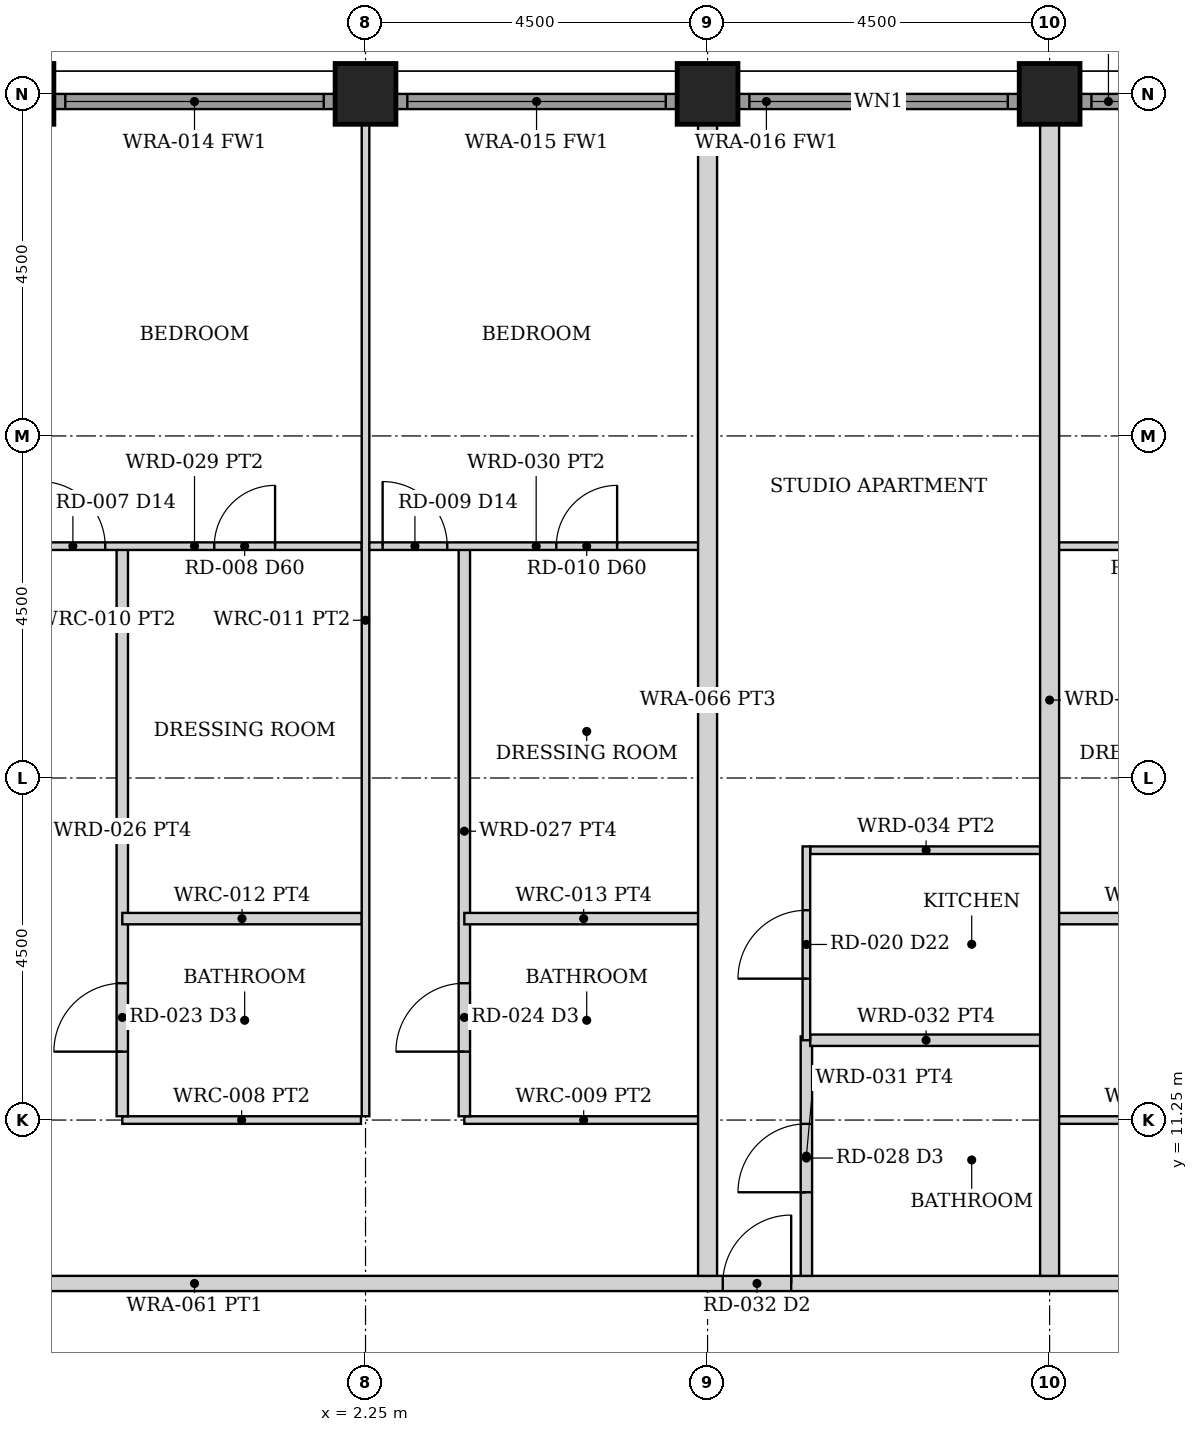
"""IFC4 building model, lengths in metres.
Left out: names, types, materials, properties, quantities, classifications, styles, units other than length and angle.
Written with IfcOpenShell. Run it as: python <this file> out.ifc"""

import sys

from ifc_helpers import new_model, si_unit, direction, frame, frame_2d, origin, origin_2d, place, context, subcontext, project, spatial, rectangle, hollow_rectangle, extrude, element, fill, save


model = new_model("IFC4")
c1 = context("Model", 3, precision=1e-05, world=origin(), true_north=direction((0.0, 1.0)))
c2 = subcontext(c1, "Body", "Model", "MODEL_VIEW")
j1 = project(units=[si_unit("LENGTHUNIT", "METRE"), si_unit("PLANEANGLEUNIT", "RADIAN")], contexts=[c1])
p1 = place(None, origin())
s1 = spatial("IfcSite", under=j1, at=p1, CompositionType="ELEMENT")
p2 = place(p1, origin())
s2 = spatial("IfcBuilding", under=s1, at=p2, CompositionType="ELEMENT")
p3 = place(p2, frame((0.0, 0.0, 58.0)))
s3 = spatial("IfcBuildingStorey", under=s2, at=p3, CompositionType="ELEMENT", Elevation=58.0)
for number, where, z_axis, x_axis in (
    (1, (-2.25, 24.75, 0.0), (0.0, 0.0, 1.0), (0.0, 1.0, 0.0)),
    (2, (2.25, 24.75, 0.0), (0.0, 0.0, 1.0), (0.0, 1.0, 0.0)),
    (3, (6.75, 24.75, 0.0), (0.0, 0.0, 1.0), (0.0, 1.0, 0.0)),
    (4, (11.25, 24.75, 0.0), (0.0, 0.0, 1.0), (0.0, 1.0, 0.0)),
):
    element("IfcColumn", number, at=place(p3, frame(where, z_axis=z_axis, x_axis=x_axis)), inside=s3, PredefinedType="COLUMN", context=c2, shape_type="SweptSolid", body=[
        extrude(hollow_rectangle(XDim=0.8, YDim=0.8, WallThickness=0.06, at=origin_2d()), origin(), (0.0, 0.0, 1.0), 3.5),
    ])
p4 = place(p3, frame((-1.845, 24.65, 0.0), z_axis=(0.0, 0.0, 1.0), x_axis=(1.0, 0.0, 0.0)))
e5 = element("IfcWall", 5, at=p4, inside=s3, PredefinedType="SOLIDWALL", context=c2, shape_type="SweptSolid", body=[
    extrude(rectangle(XDim=3.69, YDim=0.2, at=frame_2d((1.845, 0.0))), origin(), (0.0, 0.0, 1.0), 2.379),
])
p5 = place(p4, frame((0.145, 0.0, 0.3)))
e6 = element("IfcOpeningElement", 6, at=p5, cuts=e5, PredefinedType="OPENING", context=c2, shape_type="SweptSolid", body=[
    extrude(rectangle(XDim=3.4, YDim=1.929, at=frame_2d((1.7, 0.964))), frame((0.0, 0.11, 0.0), z_axis=(0.0, -1.0, 0.0), x_axis=(1.0, 0.0, 0.0)), (0.0, 0.0, 1.0), 0.22),
])
p6 = place(p3, frame((2.655, 24.65, 0.0), z_axis=(0.0, 0.0, 1.0), x_axis=(1.0, 0.0, 0.0)))
e7 = element("IfcWall", 7, at=p6, inside=s3, PredefinedType="SOLIDWALL", context=c2, shape_type="SweptSolid", body=[
    extrude(rectangle(XDim=3.69, YDim=0.2, at=frame_2d((1.845, 0.0))), origin(), (0.0, 0.0, 1.0), 2.379),
])
p7 = place(p6, frame((0.145, 0.0, 0.3)))
e8 = element("IfcOpeningElement", 8, at=p7, cuts=e7, PredefinedType="OPENING", context=c2, shape_type="SweptSolid", body=[
    extrude(rectangle(XDim=3.4, YDim=1.929, at=frame_2d((1.7, 0.964))), frame((0.0, 0.11, 0.0), z_axis=(0.0, -1.0, 0.0), x_axis=(1.0, 0.0, 0.0)), (0.0, 0.0, 1.0), 0.22),
])
p8 = place(p3, frame((7.155, 24.65, 0.0), z_axis=(0.0, 0.0, 1.0), x_axis=(1.0, 0.0, 0.0)))
e9 = element("IfcWall", 9, at=p8, inside=s3, PredefinedType="SOLIDWALL", context=c2, shape_type="SweptSolid", body=[
    extrude(rectangle(XDim=3.69, YDim=0.2, at=frame_2d((1.845, 0.0))), origin(), (0.0, 0.0, 1.0), 2.379),
])
p9 = place(p8, frame((0.145, 0.0, 0.3)))
e10 = element("IfcOpeningElement", 10, at=p9, cuts=e9, PredefinedType="OPENING", context=c2, shape_type="SweptSolid", body=[
    extrude(rectangle(XDim=3.4, YDim=1.929, at=frame_2d((1.7, 0.964))), frame((0.0, 0.11, 0.0), z_axis=(0.0, -1.0, 0.0), x_axis=(1.0, 0.0, 0.0)), (0.0, 0.0, 1.0), 0.22),
])
p10 = place(p3, frame((11.655, 24.65, 0.0), z_axis=(0.0, 0.0, 1.0), x_axis=(1.0, 0.0, 0.0)))
e11 = element("IfcWall", 11, at=p10, inside=s3, PredefinedType="SOLIDWALL", context=c2, shape_type="SweptSolid", body=[
    extrude(rectangle(XDim=3.69, YDim=0.2, at=frame_2d((1.845, 0.0))), origin(), (0.0, 0.0, 1.0), 2.379),
])
p11 = place(p10, frame((0.145, 0.0, 0.3)))
e12 = element("IfcOpeningElement", 12, at=p11, cuts=e11, PredefinedType="OPENING", context=c2, shape_type="SweptSolid", body=[
    extrude(rectangle(XDim=3.4, YDim=1.929, at=frame_2d((1.7, 0.964))), frame((0.0, 0.11, 0.0), z_axis=(0.0, -1.0, 0.0), x_axis=(1.0, 0.0, 0.0)), (0.0, 0.0, 1.0), 0.22),
])
p12 = place(p3, frame((-24.55, 9.1, 0.0), z_axis=(0.0, 0.0, 1.0), x_axis=(1.0, 0.0, 0.0)))
e13 = element("IfcWall", 13, at=p12, inside=s3, PredefinedType="PARTITIONING", context=c2, shape_type="SweptSolid", body=[
    extrude(rectangle(XDim=49.1, YDim=0.2, at=frame_2d((24.55, 0.0))), origin(), (0.0, 0.0, 1.0), 2.373),
])
p13 = place(p12, frame((5.1, 0.0, 0.0)))
e14 = element("IfcOpeningElement", 14, at=p13, cuts=e13, PredefinedType="OPENING", context=c2, shape_type="SweptSolid", body=[
    extrude(rectangle(XDim=0.9, YDim=2.1, at=frame_2d((0.45, 1.05))), frame((0.0, 0.11, 0.0), z_axis=(0.0, -1.0, 0.0), x_axis=(1.0, 0.0, 0.0)), (0.0, 0.0, 1.0), 0.22),
])
p14 = place(p12, frame((13.5, 0.0, 0.0)))
e15 = element("IfcOpeningElement", 15, at=p14, cuts=e13, PredefinedType="OPENING", context=c2, shape_type="SweptSolid", body=[
    extrude(rectangle(XDim=0.9, YDim=2.1, at=frame_2d((0.45, 1.05))), frame((0.0, 0.11, 0.0), z_axis=(0.0, -1.0, 0.0), x_axis=(1.0, 0.0, 0.0)), (0.0, 0.0, 1.0), 0.22),
])
p15 = place(p12, frame((18.1, 0.0, 0.0)))
e16 = element("IfcOpeningElement", 16, at=p15, cuts=e13, PredefinedType="OPENING", context=c2, shape_type="SweptSolid", body=[
    extrude(rectangle(XDim=0.9, YDim=2.1, at=frame_2d((0.45, 1.05))), frame((0.0, 0.11, 0.0), z_axis=(0.0, -1.0, 0.0), x_axis=(1.0, 0.0, 0.0)), (0.0, 0.0, 1.0), 0.22),
])
p16 = place(p12, frame((31.5, 0.0, 0.0)))
e17 = element("IfcOpeningElement", 17, at=p16, cuts=e13, PredefinedType="OPENING", context=c2, shape_type="SweptSolid", body=[
    extrude(rectangle(XDim=0.9, YDim=2.1, at=frame_2d((0.45, 1.05))), frame((0.0, 0.11, 0.0), z_axis=(0.0, -1.0, 0.0), x_axis=(1.0, 0.0, 0.0)), (0.0, 0.0, 1.0), 0.22),
])
p17 = place(p12, frame((43.1, 0.0, 0.0)))
e18 = element("IfcOpeningElement", 18, at=p17, cuts=e13, PredefinedType="OPENING", context=c2, shape_type="SweptSolid", body=[
    extrude(rectangle(XDim=0.9, YDim=2.1, at=frame_2d((0.45, 1.05))), frame((0.0, 0.11, 0.0), z_axis=(0.0, -1.0, 0.0), x_axis=(1.0, 0.0, 0.0)), (0.0, 0.0, 1.0), 0.22),
])
p18 = place(p3, frame((-0.95, 11.25, 0.0), z_axis=(0.0, 0.0, 1.0), x_axis=(1.0, 0.0, 0.0)))
e19 = element("IfcWall", 19, at=p18, inside=s3, PredefinedType="PARTITIONING", context=c2, shape_type="SweptSolid", body=[
    extrude(rectangle(XDim=3.14, YDim=0.1, at=frame_2d((1.57, 0.0))), origin(), (0.0, 0.0, 1.0), 2.373),
])
p19 = place(p3, frame((-0.95, 11.3, 0.0), z_axis=(0.0, 0.0, 1.0), x_axis=(0.0, 1.0, 0.0)))
e20 = element("IfcWall", 20, at=p19, inside=s3, PredefinedType="PARTITIONING", context=c2, shape_type="SweptSolid", body=[
    extrude(rectangle(XDim=7.5, YDim=0.15, at=frame_2d((3.75, 0.0))), origin(), (0.0, 0.0, 1.0), 2.373),
])
p20 = place(p19, frame((0.85, 0.0, 0.0)))
e21 = element("IfcOpeningElement", 21, at=p20, cuts=e20, PredefinedType="OPENING", context=c2, shape_type="SweptSolid", body=[
    extrude(rectangle(XDim=0.9, YDim=2.1, at=frame_2d((0.45, 1.05))), frame((0.0, 0.085, 0.0), z_axis=(0.0, -1.0, 0.0), x_axis=(1.0, 0.0, 0.0)), (0.0, 0.0, 1.0), 0.17),
])
p21 = place(p3, frame((-2.2, 18.8, 0.0), z_axis=(0.0, 0.0, 1.0), x_axis=(1.0, 0.0, 0.0)))
e22 = element("IfcWall", 22, at=p21, inside=s3, PredefinedType="PARTITIONING", context=c2, shape_type="SweptSolid", body=[
    extrude(rectangle(XDim=4.4, YDim=0.1, at=frame_2d((2.2, 0.0))), origin(), (0.0, 0.0, 1.0), 2.373),
])
p22 = place(p21, frame((0.175, 0.0, 0.0)))
e23 = element("IfcOpeningElement", 23, at=p22, cuts=e22, PredefinedType="OPENING", context=c2, shape_type="SweptSolid", body=[
    extrude(rectangle(XDim=0.85, YDim=2.1, at=frame_2d((0.425, 1.05))), frame((0.0, 0.06, 0.0), z_axis=(0.0, -1.0, 0.0), x_axis=(1.0, 0.0, 0.0)), (0.0, 0.0, 1.0), 0.12),
])
p23 = place(p21, frame((2.46, 0.0, 0.0)))
e24 = element("IfcOpeningElement", 24, at=p23, cuts=e22, PredefinedType="OPENING", context=c2, shape_type="SweptSolid", body=[
    extrude(rectangle(XDim=0.8, YDim=2.1, at=frame_2d((0.4, 1.05))), frame((0.0, 0.06, 0.0), z_axis=(0.0, -1.0, 0.0), x_axis=(1.0, 0.0, 0.0)), (0.0, 0.0, 1.0), 0.12),
])
p24 = place(p3, frame((-0.95, 13.9, 0.0), z_axis=(0.0, 0.0, 1.0), x_axis=(1.0, 0.0, 0.0)))
e25 = element("IfcWall", 25, at=p24, inside=s3, PredefinedType="PARTITIONING", context=c2, shape_type="SweptSolid", body=[
    extrude(rectangle(XDim=3.15, YDim=0.15, at=frame_2d((1.575, 0.0))), origin(), (0.0, 0.0, 1.0), 2.373),
])
p25 = place(p3, frame((2.25, 11.3, 0.0), z_axis=(0.0, 0.0, 1.0), x_axis=(0.0, 1.0, 0.0)))
e26 = element("IfcWall", 26, at=p25, inside=s3, PredefinedType="PARTITIONING", context=c2, shape_type="SweptSolid", body=[
    extrude(rectangle(XDim=13.05, YDim=0.1, at=frame_2d((6.525, 0.0))), origin(), (0.0, 0.0, 1.0), 2.373),
])
p26 = place(p3, frame((3.55, 11.25, 0.0), z_axis=(0.0, 0.0, 1.0), x_axis=(1.0, 0.0, 0.0)))
e27 = element("IfcWall", 27, at=p26, inside=s3, PredefinedType="PARTITIONING", context=c2, shape_type="SweptSolid", body=[
    extrude(rectangle(XDim=3.14, YDim=0.1, at=frame_2d((1.57, 0.0))), origin(), (0.0, 0.0, 1.0), 2.373),
])
p27 = place(p3, frame((3.55, 11.3, 0.0), z_axis=(0.0, 0.0, 1.0), x_axis=(0.0, 1.0, 0.0)))
e28 = element("IfcWall", 28, at=p27, inside=s3, PredefinedType="PARTITIONING", context=c2, shape_type="SweptSolid", body=[
    extrude(rectangle(XDim=7.5, YDim=0.15, at=frame_2d((3.75, 0.0))), origin(), (0.0, 0.0, 1.0), 2.373),
])
p28 = place(p27, frame((0.85, 0.0, 0.0)))
e29 = element("IfcOpeningElement", 29, at=p28, cuts=e28, PredefinedType="OPENING", context=c2, shape_type="SweptSolid", body=[
    extrude(rectangle(XDim=0.9, YDim=2.1, at=frame_2d((0.45, 1.05))), frame((0.0, 0.085, 0.0), z_axis=(0.0, -1.0, 0.0), x_axis=(1.0, 0.0, 0.0)), (0.0, 0.0, 1.0), 0.17),
])
p29 = place(p3, frame((2.3, 18.8, 0.0), z_axis=(0.0, 0.0, 1.0), x_axis=(1.0, 0.0, 0.0)))
e30 = element("IfcWall", 30, at=p29, inside=s3, PredefinedType="PARTITIONING", context=c2, shape_type="SweptSolid", body=[
    extrude(rectangle(XDim=4.39, YDim=0.1, at=frame_2d((2.195, 0.0))), origin(), (0.0, 0.0, 1.0), 2.373),
])
p30 = place(p29, frame((0.175, 0.0, 0.0)))
e31 = element("IfcOpeningElement", 31, at=p30, cuts=e30, PredefinedType="OPENING", context=c2, shape_type="SweptSolid", body=[
    extrude(rectangle(XDim=0.85, YDim=2.1, at=frame_2d((0.425, 1.05))), frame((0.0, 0.06, 0.0), z_axis=(0.0, -1.0, 0.0), x_axis=(1.0, 0.0, 0.0)), (0.0, 0.0, 1.0), 0.12),
])
p31 = place(p29, frame((2.46, 0.0, 0.0)))
e32 = element("IfcOpeningElement", 32, at=p31, cuts=e30, PredefinedType="OPENING", context=c2, shape_type="SweptSolid", body=[
    extrude(rectangle(XDim=0.8, YDim=2.1, at=frame_2d((0.4, 1.05))), frame((0.0, 0.06, 0.0), z_axis=(0.0, -1.0, 0.0), x_axis=(1.0, 0.0, 0.0)), (0.0, 0.0, 1.0), 0.12),
])
p32 = place(p3, frame((3.55, 13.9, 0.0), z_axis=(0.0, 0.0, 1.0), x_axis=(1.0, 0.0, 0.0)))
e33 = element("IfcWall", 33, at=p32, inside=s3, PredefinedType="PARTITIONING", context=c2, shape_type="SweptSolid", body=[
    extrude(rectangle(XDim=3.14, YDim=0.15, at=frame_2d((1.57, 0.0))), origin(), (0.0, 0.0, 1.0), 2.373),
])
p33 = place(p3, frame((8.05, 9.2, 0.0), z_axis=(0.0, 0.0, 1.0), x_axis=(0.0, 1.0, 0.0)))
e34 = element("IfcWall", 34, at=p33, inside=s3, PredefinedType="PARTITIONING", context=c2, shape_type="SweptSolid", body=[
    extrude(rectangle(XDim=3.15, YDim=0.15, at=frame_2d((1.575, 0.0))), origin(), (0.0, 0.0, 1.0), 2.373),
])
p34 = place(p33, frame((1.1, 0.0, 0.0)))
e35 = element("IfcOpeningElement", 35, at=p34, cuts=e34, PredefinedType="OPENING", context=c2, shape_type="SweptSolid", body=[
    extrude(rectangle(XDim=0.9, YDim=2.1, at=frame_2d((0.45, 1.05))), frame((0.0, 0.085, 0.0), z_axis=(0.0, -1.0, 0.0), x_axis=(1.0, 0.0, 0.0)), (0.0, 0.0, 1.0), 0.17),
])
p35 = place(p3, frame((8.1, 12.3, 0.0), z_axis=(0.0, 0.0, 1.0), x_axis=(1.0, 0.0, 0.0)))
e36 = element("IfcWall", 36, at=p35, inside=s3, PredefinedType="PARTITIONING", context=c2, shape_type="SweptSolid", body=[
    extrude(rectangle(XDim=3.05, YDim=0.15, at=frame_2d((1.525, 0.0))), origin(), (0.0, 0.0, 1.0), 2.373),
])
p36 = place(p3, frame((8.1, 14.8, 0.0), z_axis=(0.0, 0.0, 1.0), x_axis=(1.0, 0.0, 0.0)))
e37 = element("IfcWall", 37, at=p36, inside=s3, PredefinedType="PARTITIONING", context=c2, shape_type="SweptSolid", body=[
    extrude(rectangle(XDim=3.05, YDim=0.1, at=frame_2d((1.525, 0.0))), origin(), (0.0, 0.0, 1.0), 2.373),
])
p37 = place(p3, frame((8.05, 12.3, 0.0), z_axis=(0.0, 0.0, 1.0), x_axis=(0.0, 1.0, 0.0)))
e38 = element("IfcWall", 38, at=p37, inside=s3, PredefinedType="PARTITIONING", context=c2, shape_type="SweptSolid", body=[
    extrude(rectangle(XDim=2.55, YDim=0.1, at=frame_2d((1.275, 0.0))), origin(), (0.0, 0.0, 1.0), 2.373),
])
p38 = place(p37, frame((0.81, 0.0, 0.0)))
e39 = element("IfcOpeningElement", 39, at=p38, cuts=e38, PredefinedType="OPENING", context=c2, shape_type="SweptSolid", body=[
    extrude(rectangle(XDim=0.9, YDim=2.1, at=frame_2d((0.45, 1.05))), frame((0.0, 0.06, 0.0), z_axis=(0.0, -1.0, 0.0), x_axis=(1.0, 0.0, 0.0)), (0.0, 0.0, 1.0), 0.12),
])
p39 = place(p3, frame((11.31, 11.25, 0.0), z_axis=(0.0, 0.0, 1.0), x_axis=(1.0, 0.0, 0.0)))
e40 = element("IfcWall", 40, at=p39, inside=s3, PredefinedType="PARTITIONING", context=c2, shape_type="SweptSolid", body=[
    extrude(rectangle(XDim=3.14, YDim=0.1, at=frame_2d((1.57, 0.0))), origin(), (0.0, 0.0, 1.0), 2.373),
])
p40 = place(p3, frame((11.31, 18.8, 0.0), z_axis=(0.0, 0.0, 1.0), x_axis=(1.0, 0.0, 0.0)))
e41 = element("IfcWall", 41, at=p40, inside=s3, PredefinedType="PARTITIONING", context=c2, shape_type="SweptSolid", body=[
    extrude(rectangle(XDim=4.39, YDim=0.1, at=frame_2d((2.195, 0.0))), origin(), (0.0, 0.0, 1.0), 2.373),
])
p41 = place(p40, frame((3.365, 0.0, 0.0)))
e42 = element("IfcOpeningElement", 42, at=p41, cuts=e41, PredefinedType="OPENING", context=c2, shape_type="SweptSolid", body=[
    extrude(rectangle(XDim=0.85, YDim=2.1, at=frame_2d((0.425, 1.05))), frame((0.0, 0.06, 0.0), z_axis=(0.0, -1.0, 0.0), x_axis=(1.0, 0.0, 0.0)), (0.0, 0.0, 1.0), 0.12),
])
p42 = place(p40, frame((1.13, 0.0, 0.0)))
e43 = element("IfcOpeningElement", 43, at=p42, cuts=e41, PredefinedType="OPENING", context=c2, shape_type="SweptSolid", body=[
    extrude(rectangle(XDim=0.8, YDim=2.1, at=frame_2d((0.4, 1.05))), frame((0.0, 0.06, 0.0), z_axis=(0.0, -1.0, 0.0), x_axis=(1.0, 0.0, 0.0)), (0.0, 0.0, 1.0), 0.12),
])
p43 = place(p3, frame((11.31, 13.9, 0.0), z_axis=(0.0, 0.0, 1.0), x_axis=(1.0, 0.0, 0.0)))
e44 = element("IfcWall", 44, at=p43, inside=s3, PredefinedType="PARTITIONING", context=c2, shape_type="SweptSolid", body=[
    extrude(rectangle(XDim=3.14, YDim=0.15, at=frame_2d((1.57, 0.0))), origin(), (0.0, 0.0, 1.0), 2.373),
])
for number, where, z_axis, x_axis in (
    (45, (6.75, 9.2, 0.0), (0.0, 0.0, 1.0), (0.0, 1.0, 0.0)),
    (46, (11.25, 9.2, 0.0), (0.0, 0.0, 1.0), (0.0, 1.0, 0.0)),
):
    element("IfcWall", number, at=place(p3, frame(where, z_axis=z_axis, x_axis=x_axis)), inside=s3, PredefinedType="PARTITIONING", context=c2, shape_type="SweptSolid", body=[
        extrude(rectangle(XDim=15.15, YDim=0.25, at=frame_2d((7.575, 0.0))), origin(), (0.0, 0.0, 1.0), 2.373),
    ])
p44 = place(p5, origin())
e47 = element("IfcWindow", 47, at=p44, inside=s3, PartitioningType="SINGLE_PANEL", PredefinedType="WINDOW", context=c2, shape_type="SweptSolid", body=[
    extrude(rectangle(XDim=3.4, YDim=1.929, at=frame_2d((1.7, 0.964))), frame((0.0, 0.03, 0.0), z_axis=(0.0, -1.0, 0.0), x_axis=(1.0, 0.0, 0.0)), (0.0, 0.0, 1.0), 0.06),
])
fill(e6, e47)
p45 = place(p7, origin())
e48 = element("IfcWindow", 48, at=p45, inside=s3, PartitioningType="SINGLE_PANEL", PredefinedType="WINDOW", context=c2, shape_type="SweptSolid", body=[
    extrude(rectangle(XDim=3.4, YDim=1.929, at=frame_2d((1.7, 0.964))), frame((0.0, 0.03, 0.0), z_axis=(0.0, -1.0, 0.0), x_axis=(1.0, 0.0, 0.0)), (0.0, 0.0, 1.0), 0.06),
])
fill(e8, e48)
p46 = place(p9, origin())
e49 = element("IfcWindow", 49, at=p46, inside=s3, PartitioningType="SINGLE_PANEL", PredefinedType="WINDOW", context=c2, shape_type="SweptSolid", body=[
    extrude(rectangle(XDim=3.4, YDim=1.929, at=frame_2d((1.7, 0.964))), frame((0.0, 0.03, 0.0), z_axis=(0.0, -1.0, 0.0), x_axis=(1.0, 0.0, 0.0)), (0.0, 0.0, 1.0), 0.06),
])
fill(e10, e49)
p47 = place(p11, origin())
e50 = element("IfcWindow", 50, at=p47, inside=s3, PartitioningType="SINGLE_PANEL", PredefinedType="WINDOW", context=c2, shape_type="SweptSolid", body=[
    extrude(rectangle(XDim=3.4, YDim=1.929, at=frame_2d((1.7, 0.964))), frame((0.0, 0.03, 0.0), z_axis=(0.0, -1.0, 0.0), x_axis=(1.0, 0.0, 0.0)), (0.0, 0.0, 1.0), 0.06),
])
fill(e12, e50)
p48 = place(p22, origin())
e51 = element("IfcDoor", 51, at=p48, inside=s3, OperationType="SINGLE_SWING_LEFT", PredefinedType="DOOR", context=c2, shape_type="SweptSolid", body=[
    extrude(rectangle(XDim=0.85, YDim=2.1, at=frame_2d((0.425, 1.05))), frame((0.0, 0.025, 0.0), z_axis=(0.0, -1.0, 0.0), x_axis=(1.0, 0.0, 0.0)), (0.0, 0.0, 1.0), 0.05),
])
fill(e23, e51)
p49 = place(p20, origin())
e52 = element("IfcDoor", 52, at=p49, inside=s3, OperationType="SINGLE_SWING_LEFT", PredefinedType="DOOR", context=c2, shape_type="SweptSolid", body=[
    extrude(rectangle(XDim=0.9, YDim=2.1, at=frame_2d((0.45, 1.05))), frame((0.0, 0.025, 0.0), z_axis=(0.0, -1.0, 0.0), x_axis=(1.0, 0.0, 0.0)), (0.0, 0.0, 1.0), 0.05),
])
fill(e21, e52)
p50 = place(p23, origin())
e53 = element("IfcDoor", 53, at=p50, inside=s3, OperationType="SINGLE_SWING_RIGHT", PredefinedType="DOOR", context=c2, shape_type="SweptSolid", body=[
    extrude(rectangle(XDim=0.8, YDim=2.1, at=frame_2d((0.4, 1.05))), frame((0.0, 0.025, 0.0), z_axis=(0.0, -1.0, 0.0), x_axis=(1.0, 0.0, 0.0)), (0.0, 0.0, 1.0), 0.05),
])
fill(e24, e53)
p51 = place(p30, origin())
e54 = element("IfcDoor", 54, at=p51, inside=s3, OperationType="SINGLE_SWING_LEFT", PredefinedType="DOOR", context=c2, shape_type="SweptSolid", body=[
    extrude(rectangle(XDim=0.85, YDim=2.1, at=frame_2d((0.425, 1.05))), frame((0.0, 0.025, 0.0), z_axis=(0.0, -1.0, 0.0), x_axis=(1.0, 0.0, 0.0)), (0.0, 0.0, 1.0), 0.05),
])
fill(e31, e54)
p52 = place(p28, origin())
e55 = element("IfcDoor", 55, at=p52, inside=s3, OperationType="SINGLE_SWING_LEFT", PredefinedType="DOOR", context=c2, shape_type="SweptSolid", body=[
    extrude(rectangle(XDim=0.9, YDim=2.1, at=frame_2d((0.45, 1.05))), frame((0.0, 0.025, 0.0), z_axis=(0.0, -1.0, 0.0), x_axis=(1.0, 0.0, 0.0)), (0.0, 0.0, 1.0), 0.05),
])
fill(e29, e55)
p53 = place(p31, origin())
e56 = element("IfcDoor", 56, at=p53, inside=s3, OperationType="SINGLE_SWING_RIGHT", PredefinedType="DOOR", context=c2, shape_type="SweptSolid", body=[
    extrude(rectangle(XDim=0.8, YDim=2.1, at=frame_2d((0.4, 1.05))), frame((0.0, 0.025, 0.0), z_axis=(0.0, -1.0, 0.0), x_axis=(1.0, 0.0, 0.0)), (0.0, 0.0, 1.0), 0.05),
])
fill(e32, e56)
p54 = place(p16, origin())
e57 = element("IfcDoor", 57, at=p54, inside=s3, OperationType="SINGLE_SWING_RIGHT", PredefinedType="DOOR", context=c2, shape_type="SweptSolid", body=[
    extrude(rectangle(XDim=0.9, YDim=2.1, at=frame_2d((0.45, 1.05))), frame((0.0, 0.025, 0.0), z_axis=(0.0, -1.0, 0.0), x_axis=(1.0, 0.0, 0.0)), (0.0, 0.0, 1.0), 0.05),
])
fill(e17, e57)
p55 = place(p34, origin())
e58 = element("IfcDoor", 58, at=p55, inside=s3, OperationType="SINGLE_SWING_LEFT", PredefinedType="DOOR", context=c2, shape_type="SweptSolid", body=[
    extrude(rectangle(XDim=0.9, YDim=2.1, at=frame_2d((0.45, 1.05))), frame((0.0, 0.025, 0.0), z_axis=(0.0, -1.0, 0.0), x_axis=(1.0, 0.0, 0.0)), (0.0, 0.0, 1.0), 0.05),
])
fill(e35, e58)
p56 = place(p38, origin())
e59 = element("IfcDoor", 59, at=p56, inside=s3, OperationType="SINGLE_SWING_LEFT", PredefinedType="DOOR", context=c2, shape_type="SweptSolid", body=[
    extrude(rectangle(XDim=0.9, YDim=2.1, at=frame_2d((0.45, 1.05))), frame((0.0, 0.025, 0.0), z_axis=(0.0, -1.0, 0.0), x_axis=(1.0, 0.0, 0.0)), (0.0, 0.0, 1.0), 0.05),
])
fill(e39, e59)
save(model, sys.argv[1])
